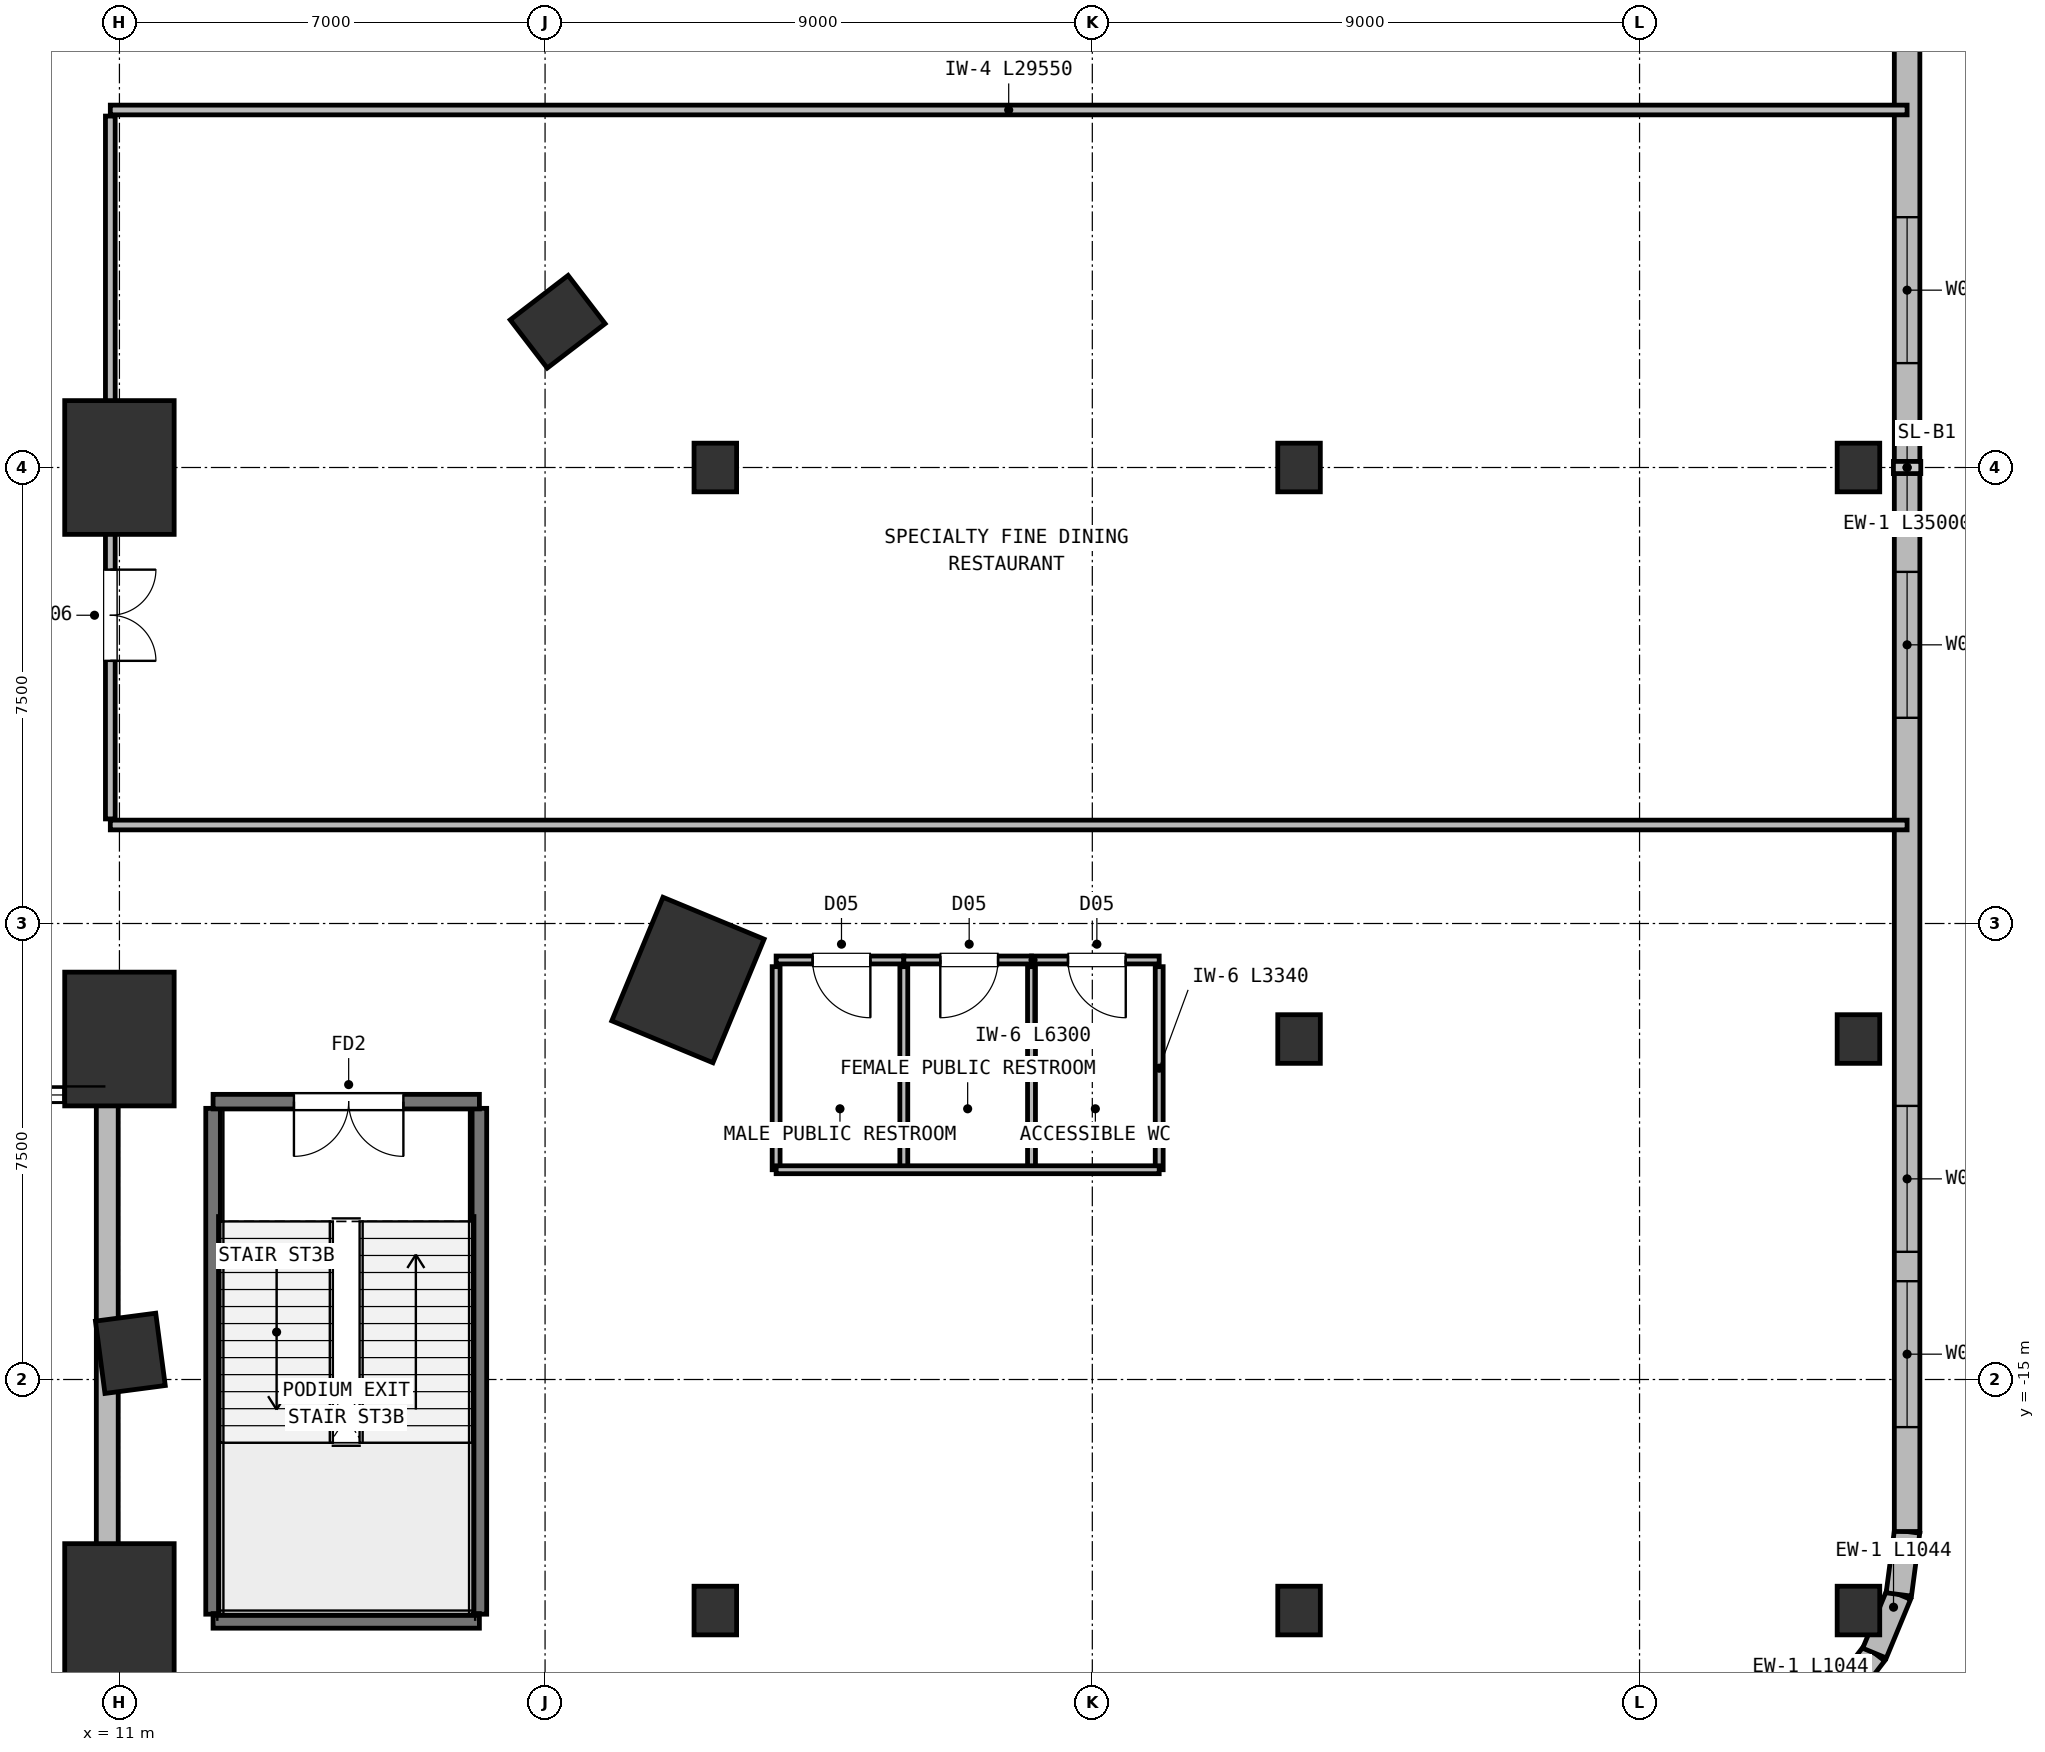
"""IFC4 building model, lengths in metres.
Left out: names, types, materials, properties, quantities, classifications, styles, units other than length and angle.
Written with IfcOpenShell. Run it as: python <this file> out.ifc"""

import sys

from ifc_helpers import new_model, si_unit, direction, frame, frame_2d, origin, origin_2d, place, context, subcontext, project, spatial, rectangle, extrude, element, fill, save


model = new_model("IFC4")
c1 = context("Model", 3, precision=1e-05, world=origin(), true_north=direction((0.0, 1.0)))
c2 = subcontext(c1, "Body", "Model", "MODEL_VIEW")
j1 = project(units=[si_unit("LENGTHUNIT", "METRE"), si_unit("PLANEANGLEUNIT", "RADIAN")], contexts=[c1])
p1 = place(None, origin())
s1 = spatial("IfcSite", under=j1, at=p1, CompositionType="ELEMENT")
p2 = place(p1, origin())
s2 = spatial("IfcBuilding", under=s1, at=p2, CompositionType="ELEMENT")
p3 = place(p2, frame((0.0, 0.0, 11.0)))
s3 = spatial("IfcBuildingStorey", under=s2, at=p3, CompositionType="ELEMENT", Elevation=11.0)
p4 = place(p3, frame((11.179, -14.569, 0.0), z_axis=(0.0, 0.0, 1.0), x_axis=(0.991444861374, 0.13052619222, 0.0)))
e1 = element("IfcColumn", 1, at=p4, inside=s3, PredefinedType="COLUMN", context=c2, shape_type="SweptSolid", body=[
    extrude(rectangle(XDim=1.0, YDim=1.2, at=origin_2d()), origin(), (0.0, 0.0, 1.0), 5.0),
])
p5 = place(p3, frame((20.35, -8.429, 0.0), z_axis=(0.0, 0.0, 1.0), x_axis=(-0.923879532511, 0.382683432365, 0.0)))
e2 = element("IfcColumn", 2, at=p5, inside=s3, PredefinedType="COLUMN", context=c2, shape_type="SweptSolid", body=[
    extrude(rectangle(XDim=1.8, YDim=2.2, at=origin_2d()), origin(), (0.0, 0.0, 1.0), 5.0),
])
p6 = place(p3, frame((18.207, 2.397, 0.0), z_axis=(0.0, 0.0, 1.0), x_axis=(-0.608761429009, 0.793353340291, 0.0)))
e3 = element("IfcColumn", 3, at=p6, inside=s3, PredefinedType="COLUMN", context=c2, shape_type="SweptSolid", body=[
    extrude(rectangle(XDim=1.0, YDim=1.2, at=origin_2d()), origin(), (0.0, 0.0, 1.0), 5.0),
])
for number, where, z_axis, x_axis in (
    (4, (11.0, -18.8, 0.0), (0.0, 0.0, 1.0), (1.0, 0.0, 0.0)),
    (5, (11.0, -9.4, 0.0), (0.0, 0.0, 1.0), (1.0, 0.0, 0.0)),
    (6, (11.0, 0.0, 0.0), (0.0, 0.0, 1.0), (1.0, 0.0, 0.0)),
):
    element("IfcColumn", number, at=place(p3, frame(where, z_axis=z_axis, x_axis=x_axis)), inside=s3, PredefinedType="COLUMN", context=c2, shape_type="SweptSolid", body=[
        extrude(rectangle(XDim=1.8, YDim=2.2, at=origin_2d()), origin(), (0.0, 0.0, 1.0), 5.0),
    ])
for number, where, z_axis, x_axis in (
    (7, (20.8, -18.8, 0.0), (0.0, 0.0, 1.0), (1.0, 0.0, 0.0)),
    (8, (20.8, 0.0, 0.0), (0.0, 0.0, 1.0), (1.0, 0.0, 0.0)),
    (9, (30.4, -18.8, 0.0), (0.0, 0.0, 1.0), (1.0, 0.0, 0.0)),
    (10, (30.4, -9.4, 0.0), (0.0, 0.0, 1.0), (1.0, 0.0, 0.0)),
    (11, (30.4, 0.0, 0.0), (0.0, 0.0, 1.0), (1.0, 0.0, 0.0)),
    (12, (39.6, -18.8, 0.0), (0.0, 0.0, 1.0), (1.0, 0.0, 0.0)),
    (13, (39.6, -9.4, 0.0), (0.0, 0.0, 1.0), (1.0, 0.0, 0.0)),
    (14, (39.6, 0.0, 0.0), (0.0, 0.0, 1.0), (1.0, 0.0, 0.0)),
):
    element("IfcColumn", number, at=place(p3, frame(where, z_axis=z_axis, x_axis=x_axis)), inside=s3, PredefinedType="COLUMN", context=c2, shape_type="SweptSolid", body=[
        extrude(rectangle(XDim=0.7, YDim=0.8, at=origin_2d()), origin(), (0.0, 0.0, 1.0), 5.0),
    ])
p7 = place(p3, frame((10.8, -10.32, 0.0), z_axis=(0.0, 0.0, 1.0), x_axis=(0.0, -1.0, 0.0)))
e15 = element("IfcWall", 15, at=p7, inside=s3, PredefinedType="SOLIDWALL", context=c2, shape_type="SweptSolid", body=[
    extrude(rectangle(XDim=10.97, YDim=0.36, at=frame_2d((5.485, 0.0))), origin(), (0.0, 0.0, 1.0), 2.84),
])
p8 = place(p3, frame((39.864, -19.5, 0.0), z_axis=(0.0, 0.0, 1.0), x_axis=(-0.608681879412, -0.793414374508, 0.0)))
e16 = element("IfcWall", 16, at=p8, inside=s3, PredefinedType="SOLIDWALL", context=c2, shape_type="SweptSolid", body=[
    extrude(rectangle(XDim=1.044, YDim=0.42, at=frame_2d((0.522, 0.0))), origin(), (0.0, 0.0, 1.0), 4.66),
])
p9 = place(p3, frame((40.264, -18.535, 0.0), z_axis=(0.0, 0.0, 1.0), x_axis=(-0.382771688877, -0.923842970528, 0.0)))
e17 = element("IfcWall", 17, at=p9, inside=s3, PredefinedType="SOLIDWALL", context=c2, shape_type="SweptSolid", body=[
    extrude(rectangle(XDim=1.044, YDim=0.42, at=frame_2d((0.522, 0.0))), origin(), (0.0, 0.0, 1.0), 4.66),
])
p10 = place(p3, frame((40.4, -17.5, 0.0), z_axis=(0.0, 0.0, 1.0), x_axis=(-0.130448465198, -0.991455091231, 0.0)))
e18 = element("IfcWall", 18, at=p10, inside=s3, PredefinedType="SOLIDWALL", context=c2, shape_type="SweptSolid", body=[
    extrude(rectangle(XDim=1.044, YDim=0.42, at=frame_2d((0.522, 0.0))), origin(), (0.0, 0.0, 1.0), 4.66),
])
p11 = place(p3, frame((40.4, 17.5, 0.0), z_axis=(0.0, 0.0, 1.0), x_axis=(0.0, -1.0, 0.0)))
e19 = element("IfcWall", 19, at=p11, inside=s3, PredefinedType="SOLIDWALL", context=c2, shape_type="SweptSolid", body=[
    extrude(rectangle(XDim=35.0, YDim=0.42, at=frame_2d((17.5, 0.0))), origin(), (0.0, 0.0, 1.0), 4.66),
])
p12 = place(p11, frame((1.717, 0.0, 0.95)))
e20 = element("IfcOpeningElement", 20, at=p12, cuts=e19, PredefinedType="OPENING", context=c2, shape_type="SweptSolid", body=[
    extrude(rectangle(XDim=2.4, YDim=2.6, at=frame_2d((1.2, 1.3))), frame((0.0, 0.22, 0.0), z_axis=(0.0, -1.0, 0.0), x_axis=(1.0, 0.0, 0.0)), (0.0, 0.0, 1.0), 0.44),
])
p13 = place(p11, frame((4.6, 0.0, 0.95)))
e21 = element("IfcOpeningElement", 21, at=p13, cuts=e19, PredefinedType="OPENING", context=c2, shape_type="SweptSolid", body=[
    extrude(rectangle(XDim=2.4, YDim=2.6, at=frame_2d((1.2, 1.3))), frame((0.0, 0.22, 0.0), z_axis=(0.0, -1.0, 0.0), x_axis=(1.0, 0.0, 0.0)), (0.0, 0.0, 1.0), 0.44),
])
p14 = place(p11, frame((13.383, 0.0, 0.95)))
e22 = element("IfcOpeningElement", 22, at=p14, cuts=e19, PredefinedType="OPENING", context=c2, shape_type="SweptSolid", body=[
    extrude(rectangle(XDim=2.4, YDim=2.6, at=frame_2d((1.2, 1.3))), frame((0.0, 0.22, 0.0), z_axis=(0.0, -1.0, 0.0), x_axis=(1.0, 0.0, 0.0)), (0.0, 0.0, 1.0), 0.44),
])
p15 = place(p11, frame((19.217, 0.0, 0.95)))
e23 = element("IfcOpeningElement", 23, at=p15, cuts=e19, PredefinedType="OPENING", context=c2, shape_type="SweptSolid", body=[
    extrude(rectangle(XDim=2.4, YDim=2.6, at=frame_2d((1.2, 1.3))), frame((0.0, 0.22, 0.0), z_axis=(0.0, -1.0, 0.0), x_axis=(1.0, 0.0, 0.0)), (0.0, 0.0, 1.0), 0.44),
])
p16 = place(p11, frame((28.0, 0.0, 0.95)))
e24 = element("IfcOpeningElement", 24, at=p16, cuts=e19, PredefinedType="OPENING", context=c2, shape_type="SweptSolid", body=[
    extrude(rectangle(XDim=2.4, YDim=2.6, at=frame_2d((1.2, 1.3))), frame((0.0, 0.22, 0.0), z_axis=(0.0, -1.0, 0.0), x_axis=(1.0, 0.0, 0.0)), (0.0, 0.0, 1.0), 0.44),
])
p17 = place(p11, frame((30.883, 0.0, 0.95)))
e25 = element("IfcOpeningElement", 25, at=p17, cuts=e19, PredefinedType="OPENING", context=c2, shape_type="SweptSolid", body=[
    extrude(rectangle(XDim=2.4, YDim=2.6, at=frame_2d((1.2, 1.3))), frame((0.0, 0.22, 0.0), z_axis=(0.0, -1.0, 0.0), x_axis=(1.0, 0.0, 0.0)), (0.0, 0.0, 1.0), 0.44),
])
for number, where, z_axis, x_axis in (
    (26, (12.54, -18.86, 0.0), (0.0, 0.0, 1.0), (0.0, 1.0, 0.0)),
    (27, (16.92, -18.86, 0.0), (0.0, 0.0, 1.0), (0.0, 1.0, 0.0)),
):
    element("IfcWall", number, at=place(p3, frame(where, z_axis=z_axis, x_axis=x_axis)), inside=s3, PredefinedType="SHEAR", context=c2, shape_type="SweptSolid", body=[
        extrude(rectangle(XDim=8.32, YDim=0.24, at=frame_2d((4.16, 0.0))), origin(), (0.0, 0.0, 1.0), 4.66),
    ])
p18 = place(p3, frame((12.54, -18.97, 0.0), z_axis=(0.0, 0.0, 1.0), x_axis=(1.0, 0.0, 0.0)))
e28 = element("IfcWall", 28, at=p18, inside=s3, PredefinedType="SHEAR", context=c2, shape_type="SweptSolid", body=[
    extrude(rectangle(XDim=4.38, YDim=0.24, at=frame_2d((2.19, 0.0))), origin(), (0.0, 0.0, 1.0), 4.66),
])
p19 = place(p3, frame((16.92, -10.43, 0.0), z_axis=(0.0, 0.0, 1.0), x_axis=(-1.0, 0.0, 0.0)))
e29 = element("IfcWall", 29, at=p19, inside=s3, PredefinedType="SHEAR", context=c2, shape_type="SweptSolid", body=[
    extrude(rectangle(XDim=4.38, YDim=0.24, at=frame_2d((2.19, 0.0))), origin(), (0.0, 0.0, 1.0), 4.66),
])
p20 = place(p19, frame((1.25, 0.0, 0.0)))
e30 = element("IfcOpeningElement", 30, at=p20, cuts=e29, PredefinedType="OPENING", context=c2, shape_type="SweptSolid", body=[
    extrude(rectangle(XDim=1.8, YDim=2.2, at=frame_2d((0.9, 1.1))), frame((0.0, 0.13, 0.0), z_axis=(0.0, -1.0, 0.0), x_axis=(1.0, 0.0, 0.0)), (0.0, 0.0, 1.0), 0.26),
])
p21 = place(p3, frame((23.9, -8.1, 0.0), z_axis=(0.0, 0.0, 1.0), x_axis=(-1.0, 0.0, 0.0)))
e31 = element("IfcWall", 31, at=p21, inside=s3, PredefinedType="PARTITIONING", context=c2, shape_type="SweptSolid", body=[
    extrude(rectangle(XDim=2.1, YDim=0.13, at=frame_2d((1.05, 0.0))), origin(), (0.0, 0.0, 1.0), 4.66),
])
p22 = place(p21, frame((0.55, 0.0, 0.0)))
e32 = element("IfcOpeningElement", 32, at=p22, cuts=e31, PredefinedType="OPENING", context=c2, shape_type="SweptSolid", body=[
    extrude(rectangle(XDim=0.95, YDim=2.1, at=frame_2d((0.475, 1.05))), frame((0.0, 0.075, 0.0), z_axis=(0.0, -1.0, 0.0), x_axis=(1.0, 0.0, 0.0)), (0.0, 0.0, 1.0), 0.15),
])
p23 = place(p3, frame((21.8, -11.55, 0.0), z_axis=(0.0, 0.0, 1.0), x_axis=(0.0, 1.0, 0.0)))
e33 = element("IfcWall", 33, at=p23, inside=s3, PredefinedType="PARTITIONING", context=c2, shape_type="SweptSolid", body=[
    extrude(rectangle(XDim=3.34, YDim=0.13, at=frame_2d((1.67, 0.0))), origin(), (0.0, 0.0, 1.0), 4.66),
])
p24 = place(p3, frame((26.0, -8.1, 0.0), z_axis=(0.0, 0.0, 1.0), x_axis=(-1.0, 0.0, 0.0)))
e34 = element("IfcWall", 34, at=p24, inside=s3, PredefinedType="PARTITIONING", context=c2, shape_type="SweptSolid", body=[
    extrude(rectangle(XDim=2.1, YDim=0.13, at=frame_2d((1.05, 0.0))), origin(), (0.0, 0.0, 1.0), 4.66),
])
p25 = place(p24, frame((0.55, 0.0, 0.0)))
e35 = element("IfcOpeningElement", 35, at=p25, cuts=e34, PredefinedType="OPENING", context=c2, shape_type="SweptSolid", body=[
    extrude(rectangle(XDim=0.95, YDim=2.1, at=frame_2d((0.475, 1.05))), frame((0.0, 0.075, 0.0), z_axis=(0.0, -1.0, 0.0), x_axis=(1.0, 0.0, 0.0)), (0.0, 0.0, 1.0), 0.15),
])
p26 = place(p3, frame((23.9, -11.55, 0.0), z_axis=(0.0, 0.0, 1.0), x_axis=(0.0, 1.0, 0.0)))
e36 = element("IfcWall", 36, at=p26, inside=s3, PredefinedType="PARTITIONING", context=c2, shape_type="SweptSolid", body=[
    extrude(rectangle(XDim=3.34, YDim=0.13, at=frame_2d((1.67, 0.0))), origin(), (0.0, 0.0, 1.0), 4.66),
])
p27 = place(p3, frame((28.1, -8.1, 0.0), z_axis=(0.0, 0.0, 1.0), x_axis=(-1.0, 0.0, 0.0)))
e37 = element("IfcWall", 37, at=p27, inside=s3, PredefinedType="PARTITIONING", context=c2, shape_type="SweptSolid", body=[
    extrude(rectangle(XDim=2.1, YDim=0.13, at=frame_2d((1.05, 0.0))), origin(), (0.0, 0.0, 1.0), 4.66),
])
p28 = place(p27, frame((0.55, 0.0, 0.0)))
e38 = element("IfcOpeningElement", 38, at=p28, cuts=e37, PredefinedType="OPENING", context=c2, shape_type="SweptSolid", body=[
    extrude(rectangle(XDim=0.95, YDim=2.1, at=frame_2d((0.475, 1.05))), frame((0.0, 0.075, 0.0), z_axis=(0.0, -1.0, 0.0), x_axis=(1.0, 0.0, 0.0)), (0.0, 0.0, 1.0), 0.15),
])
for number, where, z_axis, x_axis in (
    (39, (26.0, -11.55, 0.0), (0.0, 0.0, 1.0), (0.0, 1.0, 0.0)),
    (40, (28.1, -11.55, 0.0), (0.0, 0.0, 1.0), (0.0, 1.0, 0.0)),
):
    element("IfcWall", number, at=place(p3, frame(where, z_axis=z_axis, x_axis=x_axis)), inside=s3, PredefinedType="PARTITIONING", context=c2, shape_type="SweptSolid", body=[
        extrude(rectangle(XDim=3.34, YDim=0.13, at=frame_2d((1.67, 0.0))), origin(), (0.0, 0.0, 1.0), 4.66),
    ])
p29 = place(p3, frame((21.8, -11.55, 0.0), z_axis=(0.0, 0.0, 1.0), x_axis=(1.0, 0.0, 0.0)))
e41 = element("IfcWall", 41, at=p29, inside=s3, PredefinedType="PARTITIONING", context=c2, shape_type="SweptSolid", body=[
    extrude(rectangle(XDim=6.3, YDim=0.13, at=frame_2d((3.15, 0.0))), origin(), (0.0, 0.0, 1.0), 4.66),
])
for number, where, z_axis, x_axis in (
    (42, (40.4, 5.88, 0.0), (0.0, 0.0, 1.0), (-1.0, 0.0, 0.0)),
    (43, (10.85, -5.88, 0.0), (0.0, 0.0, 1.0), (1.0, 0.0, 0.0)),
):
    element("IfcWall", number, at=place(p3, frame(where, z_axis=z_axis, x_axis=x_axis)), inside=s3, PredefinedType="PARTITIONING", context=c2, shape_type="SweptSolid", body=[
        extrude(rectangle(XDim=29.55, YDim=0.16, at=frame_2d((14.775, 0.0))), origin(), (0.0, 0.0, 1.0), 4.66),
    ])
p30 = place(p3, frame((10.85, 5.78, 0.0), z_axis=(0.0, 0.0, 1.0), x_axis=(0.0, -1.0, 0.0)))
e44 = element("IfcWall", 44, at=p30, inside=s3, PredefinedType="PARTITIONING", context=c2, shape_type="SweptSolid", body=[
    extrude(rectangle(XDim=11.56, YDim=0.16, at=frame_2d((5.78, 0.0))), origin(), (0.0, 0.0, 1.0), 2.84),
])
p31 = place(p30, frame((7.46, 0.0, 0.0)))
e45 = element("IfcOpeningElement", 45, at=p31, cuts=e44, PredefinedType="OPENING", context=c2, shape_type="SweptSolid", body=[
    extrude(rectangle(XDim=1.5, YDim=2.2, at=frame_2d((0.75, 1.1))), frame((0.0, 0.09, 0.0), z_axis=(0.0, -1.0, 0.0), x_axis=(1.0, 0.0, 0.0)), (0.0, 0.0, 1.0), 0.18),
])
p32 = place(p14, origin())
e46 = element("IfcWindow", 46, at=p32, inside=s3, PartitioningType="SINGLE_PANEL", PredefinedType="WINDOW", context=c2, shape_type="SweptSolid", body=[
    extrude(rectangle(XDim=2.4, YDim=2.6, at=frame_2d((1.2, 1.3))), frame((0.0, 0.03, 0.0), z_axis=(0.0, -1.0, 0.0), x_axis=(1.0, 0.0, 0.0)), (0.0, 0.0, 1.0), 0.06),
])
fill(e22, e46)
p33 = place(p15, origin())
e47 = element("IfcWindow", 47, at=p33, inside=s3, PartitioningType="SINGLE_PANEL", PredefinedType="WINDOW", context=c2, shape_type="SweptSolid", body=[
    extrude(rectangle(XDim=2.4, YDim=2.6, at=frame_2d((1.2, 1.3))), frame((0.0, 0.03, 0.0), z_axis=(0.0, -1.0, 0.0), x_axis=(1.0, 0.0, 0.0)), (0.0, 0.0, 1.0), 0.06),
])
fill(e23, e47)
p34 = place(p16, origin())
e48 = element("IfcWindow", 48, at=p34, inside=s3, PartitioningType="SINGLE_PANEL", PredefinedType="WINDOW", context=c2, shape_type="SweptSolid", body=[
    extrude(rectangle(XDim=2.4, YDim=2.6, at=frame_2d((1.2, 1.3))), frame((0.0, 0.03, 0.0), z_axis=(0.0, -1.0, 0.0), x_axis=(1.0, 0.0, 0.0)), (0.0, 0.0, 1.0), 0.06),
])
fill(e24, e48)
p35 = place(p17, origin())
e49 = element("IfcWindow", 49, at=p35, inside=s3, PartitioningType="SINGLE_PANEL", PredefinedType="WINDOW", context=c2, shape_type="SweptSolid", body=[
    extrude(rectangle(XDim=2.4, YDim=2.6, at=frame_2d((1.2, 1.3))), frame((0.0, 0.03, 0.0), z_axis=(0.0, -1.0, 0.0), x_axis=(1.0, 0.0, 0.0)), (0.0, 0.0, 1.0), 0.06),
])
fill(e25, e49)
p36 = place(p20, origin())
e50 = element("IfcDoor", 50, at=p36, inside=s3, OperationType="DOUBLE_DOOR_SINGLE_SWING", PredefinedType="DOOR", context=c2, shape_type="SweptSolid", body=[
    extrude(rectangle(XDim=1.8, YDim=2.2, at=frame_2d((0.9, 1.1))), frame((0.0, 0.025, 0.0), z_axis=(0.0, -1.0, 0.0), x_axis=(1.0, 0.0, 0.0)), (0.0, 0.0, 1.0), 0.05),
])
fill(e30, e50)
p37 = place(p22, origin())
e51 = element("IfcDoor", 51, at=p37, inside=s3, OperationType="SINGLE_SWING_LEFT", PredefinedType="DOOR", context=c2, shape_type="SweptSolid", body=[
    extrude(rectangle(XDim=0.95, YDim=2.1, at=frame_2d((0.475, 1.05))), frame((0.0, 0.025, 0.0), z_axis=(0.0, -1.0, 0.0), x_axis=(1.0, 0.0, 0.0)), (0.0, 0.0, 1.0), 0.05),
])
fill(e32, e51)
p38 = place(p25, origin())
e52 = element("IfcDoor", 52, at=p38, inside=s3, OperationType="SINGLE_SWING_RIGHT", PredefinedType="DOOR", context=c2, shape_type="SweptSolid", body=[
    extrude(rectangle(XDim=0.95, YDim=2.1, at=frame_2d((0.475, 1.05))), frame((0.0, 0.025, 0.0), z_axis=(0.0, -1.0, 0.0), x_axis=(1.0, 0.0, 0.0)), (0.0, 0.0, 1.0), 0.05),
])
fill(e35, e52)
p39 = place(p28, origin())
e53 = element("IfcDoor", 53, at=p39, inside=s3, OperationType="SINGLE_SWING_LEFT", PredefinedType="DOOR", context=c2, shape_type="SweptSolid", body=[
    extrude(rectangle(XDim=0.95, YDim=2.1, at=frame_2d((0.475, 1.05))), frame((0.0, 0.025, 0.0), z_axis=(0.0, -1.0, 0.0), x_axis=(1.0, 0.0, 0.0)), (0.0, 0.0, 1.0), 0.05),
])
fill(e38, e53)
p40 = place(p31, origin())
e54 = element("IfcDoor", 54, at=p40, inside=s3, OperationType="DOUBLE_DOOR_SINGLE_SWING", PredefinedType="DOOR", context=c2, shape_type="SweptSolid", body=[
    extrude(rectangle(XDim=1.5, YDim=2.2, at=frame_2d((0.75, 1.1))), frame((0.0, 0.025, 0.0), z_axis=(0.0, -1.0, 0.0), x_axis=(1.0, 0.0, 0.0)), (0.0, 0.0, 1.0), 0.05),
])
fill(e45, e54)
save(model, sys.argv[1])
